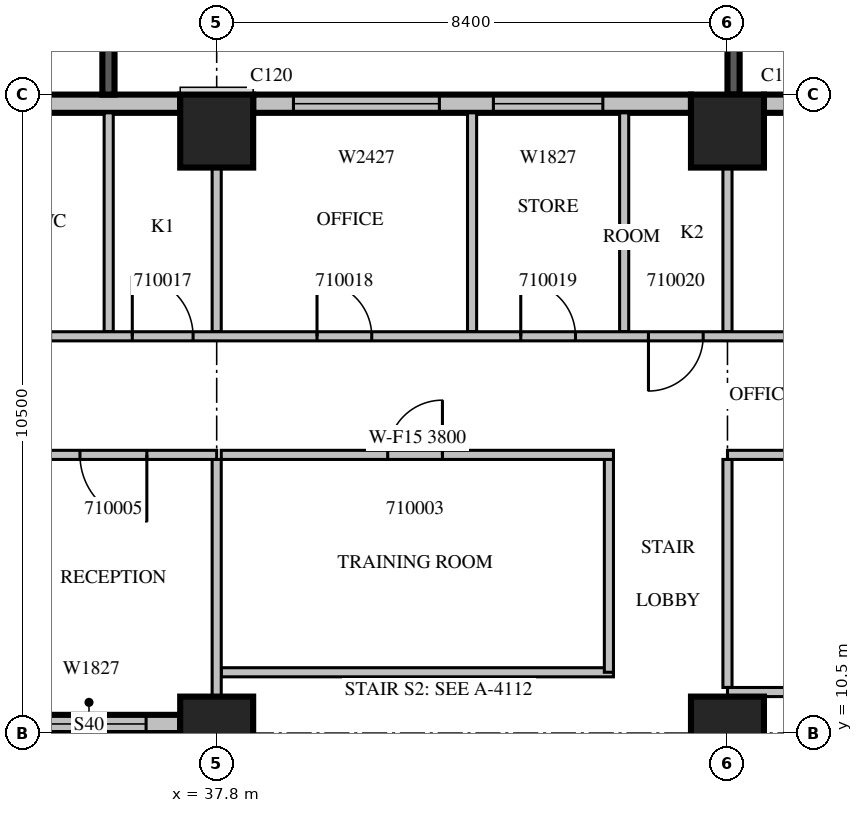
"""IFC4 building model, lengths in metres.
Left out: names, types, materials, properties, quantities, classifications, styles, units other than length and angle.
Written with IfcOpenShell. Run it as: python <this file> out.ifc"""

import sys

from ifc_helpers import new_model, si_unit, direction, frame, frame_2d, origin, origin_2d, place, context, subcontext, project, spatial, rectangle, extrude, source, transform, mapped, element, fill, save


model = new_model("IFC4")
c1 = context("Model", 3, precision=1e-05, world=origin(), true_north=direction((0.0, 1.0)))
c2 = subcontext(c1, "Body", "Model", "MODEL_VIEW")
j1 = project(units=[si_unit("LENGTHUNIT", "METRE"), si_unit("PLANEANGLEUNIT", "RADIAN")], contexts=[c1])
p1 = place(None, origin())
s1 = spatial("IfcSite", under=j1, at=p1, CompositionType="ELEMENT")
p2 = place(p1, origin())
s2 = spatial("IfcBuilding", under=s1, at=p2, CompositionType="ELEMENT")
p3 = place(p2, frame((0.0, 0.0, 53.1)))
s3 = spatial("IfcBuildingStorey", under=s2, at=p3, CompositionType="ELEMENT", Elevation=53.1)
m1 = source(origin(), c2, "Body", "SweptSolid", [
    extrude(rectangle(XDim=1.2, YDim=1.2, at=origin_2d()), origin(), (0.0, 0.0, 1.0), 4.2),
])
for number, where, z_axis, x_axis in (
    (1, (37.8, 10.5, 0.0), (0.0, 0.0, 1.0), (1.0, 0.0, 0.0)),
    (2, (46.2, 10.5, 0.0), (0.0, 0.0, 1.0), (1.0, 0.0, 0.0)),
    (3, (37.8, 20.4, 0.0), (0.0, 0.0, 1.0), (1.0, 0.0, 0.0)),
    (4, (46.2, 20.4, 0.0), (0.0, 0.0, 1.0), (1.0, 0.0, 0.0)),
):
    element("IfcColumn", number, at=place(p3, frame(where, z_axis=z_axis, x_axis=x_axis)), inside=s3, PredefinedType="COLUMN", context=c2, shape_type="MappedRepresentation", body=[
        mapped(m1, transform((0.0, 0.0, 0.0), scale=1.0)),
    ])
m2 = source(origin(), c2, "Body", "SweptSolid", [
    extrude(rectangle(XDim=3.9, YDim=0.2, at=frame_2d((1.95, 0.0))), origin(), (0.0, 0.0, 1.0), 3.79),
])
p4 = place(p3, frame((46.3, 21.0, 0.0), z_axis=(0.0, 0.0, 1.0), x_axis=(0.0, 1.0, 0.0)))
e5 = element("IfcWall", 5, at=p4, inside=s3, PredefinedType="SOLIDWALL", context=c2, shape_type="MappedRepresentation", body=[
    mapped(m2, transform((0.0, 0.0, 0.0), scale=1.0)),
])
m3 = source(origin(), c2, "Body", "SweptSolid", [
    extrude(rectangle(XDim=2.4, YDim=2.7, at=frame_2d((1.2, 1.35))), frame((0.0, 0.11, 0.0), z_axis=(0.0, -1.0, 0.0), x_axis=(1.0, 0.0, 0.0)), (0.0, 0.0, 1.0), 0.22),
])
p5 = place(p4, frame((0.75, 0.0, 0.6)))
e6 = element("IfcOpeningElement", 6, at=p5, cuts=e5, PredefinedType="OPENING", context=c2, shape_type="MappedRepresentation", body=[
    mapped(m3, transform((0.0, 0.0, 0.0), scale=1.0)),
])
m4 = source(origin(), c2, "Body", "SweptSolid", [
    extrude(rectangle(XDim=7.2, YDim=0.3, at=frame_2d((3.6, 0.0))), origin(), (0.0, 0.0, 1.0), 3.8),
])
p6 = place(p3, frame((30.0, 10.65, 0.0), z_axis=(0.0, 0.0, 1.0), x_axis=(1.0, 0.0, 0.0)))
e7 = element("IfcWall", 7, at=p6, inside=s3, PredefinedType="STANDARD", context=c2, shape_type="MappedRepresentation", body=[
    mapped(m4, transform((0.0, 0.0, 0.0), scale=1.0)),
])
m5 = source(origin(), c2, "Body", "SweptSolid", [
    extrude(rectangle(XDim=1.8, YDim=2.7, at=frame_2d((0.9, 1.35))), frame((0.0, 0.16, 0.0), z_axis=(0.0, -1.0, 0.0), x_axis=(1.0, 0.0, 0.0)), (0.0, 0.0, 1.0), 0.32),
])
p7 = place(p6, frame((4.839, 0.0, 0.6)))
e8 = element("IfcOpeningElement", 8, at=p7, cuts=e7, PredefinedType="OPENING", context=c2, shape_type="MappedRepresentation", body=[
    mapped(m5, transform((0.0, 0.0, 0.0), scale=1.0)),
])
m6 = source(origin(), c2, "Body", "SweptSolid", [
    extrude(rectangle(XDim=1.2, YDim=2.7, at=frame_2d((0.6, 1.35))), frame((0.0, 0.16, 0.0), z_axis=(0.0, -1.0, 0.0), x_axis=(1.0, 0.0, 0.0)), (0.0, 0.0, 1.0), 0.32),
])
p8 = place(p6, frame((2.152, 0.0, 0.6)))
e9 = element("IfcOpeningElement", 9, at=p8, cuts=e7, PredefinedType="OPENING", context=c2, shape_type="MappedRepresentation", body=[
    mapped(m6, transform((0.0, 0.0, 0.0), scale=1.0)),
])
m7 = source(origin(), c2, "Body", "SweptSolid", [
    extrude(rectangle(XDim=4.68, YDim=0.3, at=frame_2d((2.34, 0.0))), origin(), (0.0, 0.0, 1.0), 3.8),
])
p9 = place(p3, frame((51.48, 20.85, 0.0), z_axis=(0.0, 0.0, 1.0), x_axis=(-1.0, 0.0, 0.0)))
e10 = element("IfcWall", 10, at=p9, inside=s3, PredefinedType="STANDARD", context=c2, shape_type="MappedRepresentation", body=[
    mapped(m7, transform((0.0, 0.0, 0.0), scale=1.0)),
])
m8 = source(origin(), c2, "Body", "SweptSolid", [
    extrude(rectangle(XDim=1.0, YDim=2.1, at=frame_2d((0.5, 1.05))), frame((0.0, 0.16, 0.0), z_axis=(0.0, -1.0, 0.0), x_axis=(1.0, 0.0, 0.0)), (0.0, 0.0, 1.0), 0.32),
])
p10 = place(p9, frame((1.887, 0.0, 0.0)))
e11 = element("IfcOpeningElement", 11, at=p10, cuts=e10, PredefinedType="OPENING", context=c2, shape_type="MappedRepresentation", body=[
    mapped(m8, transform((0.0, 0.0, 0.0), scale=1.0)),
])
p11 = place(p3, frame((45.6, 20.85, 0.0), z_axis=(0.0, 0.0, 1.0), x_axis=(-1.0, 0.0, 0.0)))
e12 = element("IfcWall", 12, at=p11, inside=s3, PredefinedType="STANDARD", context=c2, shape_type="MappedRepresentation", body=[
    mapped(m4, transform((0.0, 0.0, 0.0), scale=1.0)),
])
p12 = place(p11, frame((1.45, 0.0, 0.6)))
e13 = element("IfcOpeningElement", 13, at=p12, cuts=e12, PredefinedType="OPENING", context=c2, shape_type="MappedRepresentation", body=[
    mapped(m5, transform((0.0, 0.0, 0.0), scale=1.0)),
])
m9 = source(origin(), c2, "Body", "SweptSolid", [
    extrude(rectangle(XDim=2.4, YDim=2.7, at=frame_2d((1.2, 1.35))), frame((0.0, 0.16, 0.0), z_axis=(0.0, -1.0, 0.0), x_axis=(1.0, 0.0, 0.0)), (0.0, 0.0, 1.0), 0.32),
])
p13 = place(p11, frame((4.138, 0.0, 0.6)))
e14 = element("IfcOpeningElement", 14, at=p13, cuts=e12, PredefinedType="OPENING", context=c2, shape_type="MappedRepresentation", body=[
    mapped(m9, transform((0.0, 0.0, 0.0), scale=1.0)),
])
p14 = place(p3, frame((37.2, 20.85, 0.0), z_axis=(0.0, 0.0, 1.0), x_axis=(-1.0, 0.0, 0.0)))
e15 = element("IfcWall", 15, at=p14, inside=s3, PredefinedType="STANDARD", context=c2, shape_type="MappedRepresentation", body=[
    mapped(m4, transform((0.0, 0.0, 0.0), scale=1.0)),
])
p15 = place(p14, frame((5.06, 0.0, 0.0)))
e16 = element("IfcOpeningElement", 16, at=p15, cuts=e15, PredefinedType="OPENING", context=c2, shape_type="MappedRepresentation", body=[
    mapped(m8, transform((0.0, 0.0, 0.0), scale=1.0)),
])
p16 = place(p3, frame((36.02, 21.0, 0.0), z_axis=(0.0, 0.0, 1.0), x_axis=(0.0, 1.0, 0.0)))
e17 = element("IfcWall", 17, at=p16, inside=s3, PredefinedType="SOLIDWALL", context=c2, shape_type="MappedRepresentation", body=[
    mapped(m2, transform((0.0, 0.0, 0.0), scale=1.0)),
])
p17 = place(p16, frame((0.75, 0.0, 0.6)))
e18 = element("IfcOpeningElement", 18, at=p17, cuts=e17, PredefinedType="OPENING", context=c2, shape_type="MappedRepresentation", body=[
    mapped(m3, transform((0.0, 0.0, 0.0), scale=1.0)),
])
m10 = source(origin(), c2, "Body", "SweptSolid", [
    extrude(rectangle(XDim=6.45, YDim=0.15, at=frame_2d((3.225, 0.0))), origin(), (0.0, 0.0, 1.0), 3.8),
])
p18 = place(p3, frame((37.875, 11.5, 0.0), z_axis=(0.0, 0.0, 1.0), x_axis=(1.0, 0.0, 0.0)))
e19 = element("IfcWall", 19, at=p18, inside=s3, PredefinedType="PARTITIONING", context=c2, shape_type="MappedRepresentation", body=[
    mapped(m10, transform((0.0, 0.0, 0.0), scale=1.0)),
])
m11 = source(origin(), c2, "Body", "SweptSolid", [
    extrude(rectangle(XDim=3.575, YDim=0.15, at=frame_2d((1.788, 0.0))), origin(), (0.0, 0.0, 1.0), 3.8),
])
p19 = place(p3, frame((44.25, 11.5, 0.0), z_axis=(0.0, 0.0, 1.0), x_axis=(0.0, 1.0, 0.0)))
e20 = element("IfcWall", 20, at=p19, inside=s3, PredefinedType="PARTITIONING", context=c2, shape_type="MappedRepresentation", body=[
    mapped(m11, transform((0.0, 0.0, 0.0), scale=1.0)),
])
p20 = place(p3, frame((44.325, 15.075, 0.0), z_axis=(0.0, 0.0, 1.0), x_axis=(-1.0, 0.0, 0.0)))
e21 = element("IfcWall", 21, at=p20, inside=s3, PredefinedType="PARTITIONING", context=c2, shape_type="MappedRepresentation", body=[
    mapped(m10, transform((0.0, 0.0, 0.0), scale=1.0)),
])
m12 = source(origin(), c2, "Body", "SweptSolid", [
    extrude(rectangle(XDim=0.9, YDim=2.1, at=frame_2d((0.45, 1.05))), frame((0.0, 0.085, 0.0), z_axis=(0.0, -1.0, 0.0), x_axis=(1.0, 0.0, 0.0)), (0.0, 0.0, 1.0), 0.17),
])
p21 = place(p20, frame((2.812, 0.0, 0.0)))
e22 = element("IfcOpeningElement", 22, at=p21, cuts=e21, PredefinedType="OPENING", context=c2, shape_type="MappedRepresentation", body=[
    mapped(m12, transform((0.0, 0.0, 0.0), scale=1.0)),
])
m13 = source(origin(), c2, "Body", "SweptSolid", [
    extrude(rectangle(XDim=3.901, YDim=0.15, at=frame_2d((1.95, 0.0))), origin(), (0.0, 0.0, 1.0), 3.8),
])
p22 = place(p3, frame((37.8, 11.099, 0.0), z_axis=(0.0, 0.0, 1.0), x_axis=(0.0, 1.0, 0.0)))
e23 = element("IfcWall", 23, at=p22, inside=s3, PredefinedType="PARTITIONING", context=c2, shape_type="MappedRepresentation", body=[
    mapped(m13, transform((0.0, 0.0, 0.0), scale=1.0)),
])
m14 = source(origin(), c2, "Body", "SweptSolid", [
    extrude(rectangle(XDim=3.75, YDim=0.15, at=frame_2d((1.875, 0.0))), origin(), (0.0, 0.0, 1.0), 3.8),
])
p23 = place(p3, frame((46.2, 11.25, 0.0), z_axis=(0.0, 0.0, 1.0), x_axis=(0.0, 1.0, 0.0)))
e24 = element("IfcWall", 24, at=p23, inside=s3, PredefinedType="PARTITIONING", context=c2, shape_type="MappedRepresentation", body=[
    mapped(m14, transform((0.0, 0.0, 0.0), scale=1.0)),
])
m15 = source(origin(), c2, "Body", "SweptSolid", [
    extrude(rectangle(XDim=24.9, YDim=0.15, at=frame_2d((12.45, 0.0))), origin(), (0.0, 0.0, 1.0), 3.8),
])
p24 = place(p3, frame((71.1, 11.175, 0.0), z_axis=(0.0, 0.0, 1.0), x_axis=(-1.0, 0.0, 0.0)))
e25 = element("IfcWall", 25, at=p24, inside=s3, PredefinedType="PARTITIONING", context=c2, shape_type="MappedRepresentation", body=[
    mapped(m15, transform((0.0, 0.0, 0.0), scale=1.0)),
])
m16 = source(origin(), c2, "Body", "SweptSolid", [
    extrude(rectangle(XDim=1.1, YDim=2.1, at=frame_2d((0.55, 1.05))), frame((0.0, 0.085, 0.0), z_axis=(0.0, -1.0, 0.0), x_axis=(1.0, 0.0, 0.0)), (0.0, 0.0, 1.0), 0.17),
])
p25 = place(p24, frame((4.508, 0.0, 0.0)))
e26 = element("IfcOpeningElement", 26, at=p25, cuts=e25, PredefinedType="OPENING", context=c2, shape_type="MappedRepresentation", body=[
    mapped(m16, transform((0.0, 0.0, 0.0), scale=1.0)),
])
p26 = place(p24, frame((2.143, 0.0, 0.0)))
e27 = element("IfcOpeningElement", 27, at=p26, cuts=e25, PredefinedType="OPENING", context=c2, shape_type="MappedRepresentation", body=[
    mapped(m16, transform((0.0, 0.0, 0.0), scale=1.0)),
])
m17 = source(origin(), c2, "Body", "SweptSolid", [
    extrude(rectangle(XDim=3.6, YDim=0.15, at=frame_2d((1.8, 0.0))), origin(), (0.0, 0.0, 1.0), 3.8),
])
for number, where, z_axis, x_axis in (
    (28, (36.024, 20.7, 0.0), (0.0, 0.0, 1.0), (0.0, -1.0, 0.0)),
    (29, (44.501, 20.7, 0.0), (0.0, 0.0, 1.0), (0.0, -1.0, 0.0)),
):
    element("IfcWall", number, at=place(p3, frame(where, z_axis=z_axis, x_axis=x_axis)), inside=s3, PredefinedType="PARTITIONING", context=c2, shape_type="MappedRepresentation", body=[
        mapped(m17, transform((0.0, 0.0, 0.0), scale=1.0)),
    ])
m18 = source(origin(), c2, "Body", "SweptSolid", [
    extrude(rectangle(XDim=2.701, YDim=0.15, at=frame_2d((1.351, 0.0))), origin(), (0.0, 0.0, 1.0), 3.8),
])
p27 = place(p3, frame((37.8, 17.1, 0.0), z_axis=(0.0, 0.0, 1.0), x_axis=(0.0, 1.0, 0.0)))
e30 = element("IfcWall", 30, at=p27, inside=s3, PredefinedType="PARTITIONING", context=c2, shape_type="MappedRepresentation", body=[
    mapped(m18, transform((0.0, 0.0, 0.0), scale=1.0)),
])
p28 = place(p3, frame((42.0, 17.1, 0.0), z_axis=(0.0, 0.0, 1.0), x_axis=(0.0, 1.0, 0.0)))
e31 = element("IfcWall", 31, at=p28, inside=s3, PredefinedType="PARTITIONING", context=c2, shape_type="MappedRepresentation", body=[
    mapped(m17, transform((0.0, 0.0, 0.0), scale=1.0)),
])
p29 = place(p3, frame((46.2, 17.1, 0.0), z_axis=(0.0, 0.0, 1.0), x_axis=(0.0, 1.0, 0.0)))
e32 = element("IfcWall", 32, at=p29, inside=s3, PredefinedType="PARTITIONING", context=c2, shape_type="MappedRepresentation", body=[
    mapped(m18, transform((0.0, 0.0, 0.0), scale=1.0)),
])
m19 = source(origin(), c2, "Body", "SweptSolid", [
    extrude(rectangle(XDim=8.4, YDim=0.15, at=frame_2d((4.2, 0.0))), origin(), (0.0, 0.0, 1.0), 3.8),
])
p30 = place(p3, frame((37.8, 15.075, 0.0), z_axis=(0.0, 0.0, 1.0), x_axis=(-1.0, 0.0, 0.0)))
e33 = element("IfcWall", 33, at=p30, inside=s3, PredefinedType="PARTITIONING", context=c2, shape_type="MappedRepresentation", body=[
    mapped(m19, transform((0.0, 0.0, 0.0), scale=1.0)),
])
p31 = place(p30, frame((1.149, 0.0, 0.0)))
e34 = element("IfcOpeningElement", 34, at=p31, cuts=e33, PredefinedType="OPENING", context=c2, shape_type="MappedRepresentation", body=[
    mapped(m16, transform((0.0, 0.0, 0.0), scale=1.0)),
])
p32 = place(p30, frame((6.795, 0.0, 0.0)))
e35 = element("IfcOpeningElement", 35, at=p32, cuts=e33, PredefinedType="OPENING", context=c2, shape_type="MappedRepresentation", body=[
    mapped(m12, transform((0.0, 0.0, 0.0), scale=1.0)),
])
p33 = place(p30, frame((4.293, 0.0, 0.0)))
e36 = element("IfcOpeningElement", 36, at=p33, cuts=e33, PredefinedType="OPENING", context=c2, shape_type="MappedRepresentation", body=[
    mapped(m12, transform((0.0, 0.0, 0.0), scale=1.0)),
])
p34 = place(p3, frame((71.1, 15.075, 0.0), z_axis=(0.0, 0.0, 1.0), x_axis=(-1.0, 0.0, 0.0)))
e37 = element("IfcWall", 37, at=p34, inside=s3, PredefinedType="PARTITIONING", context=c2, shape_type="MappedRepresentation", body=[
    mapped(m15, transform((0.0, 0.0, 0.0), scale=1.0)),
])
p35 = place(p34, frame((4.82, 0.0, 0.0)))
e38 = element("IfcOpeningElement", 38, at=p35, cuts=e37, PredefinedType="OPENING", context=c2, shape_type="MappedRepresentation", body=[
    mapped(m16, transform((0.0, 0.0, 0.0), scale=1.0)),
])
p36 = place(p34, frame((21.51, 0.0, 0.0)))
e39 = element("IfcOpeningElement", 39, at=p36, cuts=e37, PredefinedType="OPENING", context=c2, shape_type="MappedRepresentation", body=[
    mapped(m12, transform((0.0, 0.0, 0.0), scale=1.0)),
])
p37 = place(p34, frame((15.63, 0.0, 0.0)))
e40 = element("IfcOpeningElement", 40, at=p37, cuts=e37, PredefinedType="OPENING", context=c2, shape_type="MappedRepresentation", body=[
    mapped(m12, transform((0.0, 0.0, 0.0), scale=1.0)),
])
p38 = place(p34, frame((9.75, 0.0, 0.0)))
e41 = element("IfcOpeningElement", 41, at=p38, cuts=e37, PredefinedType="OPENING", context=c2, shape_type="MappedRepresentation", body=[
    mapped(m12, transform((0.0, 0.0, 0.0), scale=1.0)),
])
p39 = place(p34, frame((1.153, 0.0, 0.0)))
e42 = element("IfcOpeningElement", 42, at=p39, cuts=e37, PredefinedType="OPENING", context=c2, shape_type="MappedRepresentation", body=[
    mapped(m16, transform((0.0, 0.0, 0.0), scale=1.0)),
])
m20 = source(origin(), c2, "Body", "SweptSolid", [
    extrude(rectangle(XDim=37.5, YDim=0.15, at=frame_2d((18.75, 0.0))), origin(), (0.0, 0.0, 1.0), 3.8),
])
p40 = place(p3, frame((29.4, 17.025, 0.0), z_axis=(0.0, 0.0, 1.0), x_axis=(1.0, 0.0, 0.0)))
e43 = element("IfcWall", 43, at=p40, inside=s3, PredefinedType="PARTITIONING", context=c2, shape_type="MappedRepresentation", body=[
    mapped(m20, transform((0.0, 0.0, 0.0), scale=1.0)),
])
m21 = source(origin(), c2, "Body", "SweptSolid", [
    extrude(rectangle(XDim=1.0, YDim=2.1, at=frame_2d((0.5, 1.05))), frame((0.0, 0.085, 0.0), z_axis=(0.0, -1.0, 0.0), x_axis=(1.0, 0.0, 0.0)), (0.0, 0.0, 1.0), 0.17),
])
p41 = place(p40, frame((1.357, 0.0, 0.0)))
e44 = element("IfcOpeningElement", 44, at=p41, cuts=e43, PredefinedType="OPENING", context=c2, shape_type="MappedRepresentation", body=[
    mapped(m21, transform((0.0, 0.0, 0.0), scale=1.0)),
])
p42 = place(p40, frame((4.669, 0.0, 0.0)))
e45 = element("IfcOpeningElement", 45, at=p42, cuts=e43, PredefinedType="OPENING", context=c2, shape_type="MappedRepresentation", body=[
    mapped(m21, transform((0.0, 0.0, 0.0), scale=1.0)),
])
p43 = place(p40, frame((7.012, 0.0, 0.0)))
e46 = element("IfcOpeningElement", 46, at=p43, cuts=e43, PredefinedType="OPENING", context=c2, shape_type="MappedRepresentation", body=[
    mapped(m21, transform((0.0, 0.0, 0.0), scale=1.0)),
])
p44 = place(p40, frame((10.05, 0.0, 0.0)))
e47 = element("IfcOpeningElement", 47, at=p44, cuts=e43, PredefinedType="OPENING", context=c2, shape_type="MappedRepresentation", body=[
    mapped(m12, transform((0.0, 0.0, 0.0), scale=1.0)),
])
p45 = place(p40, frame((13.401, 0.0, 0.0)))
e48 = element("IfcOpeningElement", 48, at=p45, cuts=e43, PredefinedType="OPENING", context=c2, shape_type="MappedRepresentation", body=[
    mapped(m12, transform((0.0, 0.0, 0.0), scale=1.0)),
])
p46 = place(p40, frame((15.501, 0.0, 0.0)))
e49 = element("IfcOpeningElement", 49, at=p46, cuts=e43, PredefinedType="OPENING", context=c2, shape_type="MappedRepresentation", body=[
    mapped(m12, transform((0.0, 0.0, 0.0), scale=1.0)),
])
p47 = place(p40, frame((18.898, 0.0, 0.0)))
e50 = element("IfcOpeningElement", 50, at=p47, cuts=e43, PredefinedType="OPENING", context=c2, shape_type="MappedRepresentation", body=[
    mapped(m21, transform((0.0, 0.0, 0.0), scale=1.0)),
])
p48 = place(p40, frame((23.543, 0.0, 0.0)))
e51 = element("IfcOpeningElement", 51, at=p48, cuts=e43, PredefinedType="OPENING", context=c2, shape_type="MappedRepresentation", body=[
    mapped(m21, transform((0.0, 0.0, 0.0), scale=1.0)),
])
p49 = place(p40, frame((26.826, 0.0, 0.0)))
e52 = element("IfcOpeningElement", 52, at=p49, cuts=e43, PredefinedType="OPENING", context=c2, shape_type="MappedRepresentation", body=[
    mapped(m21, transform((0.0, 0.0, 0.0), scale=1.0)),
])
p50 = place(p40, frame((30.364, 0.0, 0.0)))
e53 = element("IfcOpeningElement", 53, at=p50, cuts=e43, PredefinedType="OPENING", context=c2, shape_type="MappedRepresentation", body=[
    mapped(m12, transform((0.0, 0.0, 0.0), scale=1.0)),
])
p51 = place(p40, frame((34.871, 0.0, 0.0)))
e54 = element("IfcOpeningElement", 54, at=p51, cuts=e43, PredefinedType="OPENING", context=c2, shape_type="MappedRepresentation", body=[
    mapped(m12, transform((0.0, 0.0, 0.0), scale=1.0)),
])
m22 = source(origin(), c2, "Body", "SweptSolid", [
    extrude(rectangle(XDim=1.8, YDim=2.7, at=frame_2d((0.9, 1.35))), frame((0.0, 0.03, 0.0), z_axis=(0.0, -1.0, 0.0), x_axis=(1.0, 0.0, 0.0)), (0.0, 0.0, 1.0), 0.06),
])
p52 = place(p7, origin())
e55 = element("IfcWindow", 55, at=p52, inside=s3, PartitioningType="SINGLE_PANEL", PredefinedType="WINDOW", context=c2, shape_type="MappedRepresentation", body=[
    mapped(m22, transform((0.0, 0.0, 0.0), scale=1.0)),
])
fill(e8, e55)
p53 = place(p12, origin())
e56 = element("IfcWindow", 56, at=p53, inside=s3, PartitioningType="SINGLE_PANEL", PredefinedType="WINDOW", context=c2, shape_type="MappedRepresentation", body=[
    mapped(m22, transform((0.0, 0.0, 0.0), scale=1.0)),
])
fill(e13, e56)
m23 = source(origin(), c2, "Body", "SweptSolid", [
    extrude(rectangle(XDim=2.4, YDim=2.7, at=frame_2d((1.2, 1.35))), frame((0.0, 0.03, 0.0), z_axis=(0.0, -1.0, 0.0), x_axis=(1.0, 0.0, 0.0)), (0.0, 0.0, 1.0), 0.06),
])
p54 = place(p13, origin())
e57 = element("IfcWindow", 57, at=p54, inside=s3, PartitioningType="SINGLE_PANEL", PredefinedType="WINDOW", context=c2, shape_type="MappedRepresentation", body=[
    mapped(m23, transform((0.0, 0.0, 0.0), scale=1.0)),
])
fill(e14, e57)
m24 = source(origin(), c2, "Body", "SweptSolid", [
    extrude(rectangle(XDim=0.9, YDim=2.1, at=frame_2d((0.45, 1.05))), frame((0.0, 0.025, 0.0), z_axis=(0.0, -1.0, 0.0), x_axis=(1.0, 0.0, 0.0)), (0.0, 0.0, 1.0), 0.05),
])
p55 = place(p21, origin())
e58 = element("IfcDoor", 58, at=p55, inside=s3, OperationType="SINGLE_SWING_RIGHT", PredefinedType="DOOR", context=c2, shape_type="MappedRepresentation", body=[
    mapped(m24, transform((0.0, 0.0, 0.0), scale=1.0)),
])
fill(e22, e58)
m25 = source(origin(), c2, "Body", "SweptSolid", [
    extrude(rectangle(XDim=1.1, YDim=2.1, at=frame_2d((0.55, 1.05))), frame((0.0, 0.025, 0.0), z_axis=(0.0, -1.0, 0.0), x_axis=(1.0, 0.0, 0.0)), (0.0, 0.0, 1.0), 0.05),
])
p56 = place(p31, origin())
e59 = element("IfcDoor", 59, at=p56, inside=s3, OperationType="SINGLE_SWING_LEFT", PredefinedType="DOOR", context=c2, shape_type="MappedRepresentation", body=[
    mapped(m25, transform((0.0, 0.0, 0.0), scale=1.0)),
])
fill(e34, e59)
m26 = source(origin(), c2, "Body", "SweptSolid", [
    extrude(rectangle(XDim=1.0, YDim=2.1, at=frame_2d((0.5, 1.05))), frame((0.0, 0.025, 0.0), z_axis=(0.0, -1.0, 0.0), x_axis=(1.0, 0.0, 0.0)), (0.0, 0.0, 1.0), 0.05),
])
p57 = place(p43, origin())
e60 = element("IfcDoor", 60, at=p57, inside=s3, OperationType="SINGLE_SWING_LEFT", PredefinedType="DOOR", context=c2, shape_type="MappedRepresentation", body=[
    mapped(m26, transform((0.0, 0.0, 0.0), scale=1.0)),
])
fill(e46, e60)
p58 = place(p44, origin())
e61 = element("IfcDoor", 61, at=p58, inside=s3, OperationType="SINGLE_SWING_LEFT", PredefinedType="DOOR", context=c2, shape_type="MappedRepresentation", body=[
    mapped(m24, transform((0.0, 0.0, 0.0), scale=1.0)),
])
fill(e47, e61)
p59 = place(p45, origin())
e62 = element("IfcDoor", 62, at=p59, inside=s3, OperationType="SINGLE_SWING_LEFT", PredefinedType="DOOR", context=c2, shape_type="MappedRepresentation", body=[
    mapped(m24, transform((0.0, 0.0, 0.0), scale=1.0)),
])
fill(e48, e62)
p60 = place(p46, origin())
e63 = element("IfcDoor", 63, at=p60, inside=s3, OperationType="SINGLE_SWING_RIGHT", PredefinedType="DOOR", context=c2, shape_type="MappedRepresentation", body=[
    mapped(m24, transform((0.0, 0.0, 0.0), scale=1.0)),
])
fill(e49, e63)
save(model, sys.argv[1])
